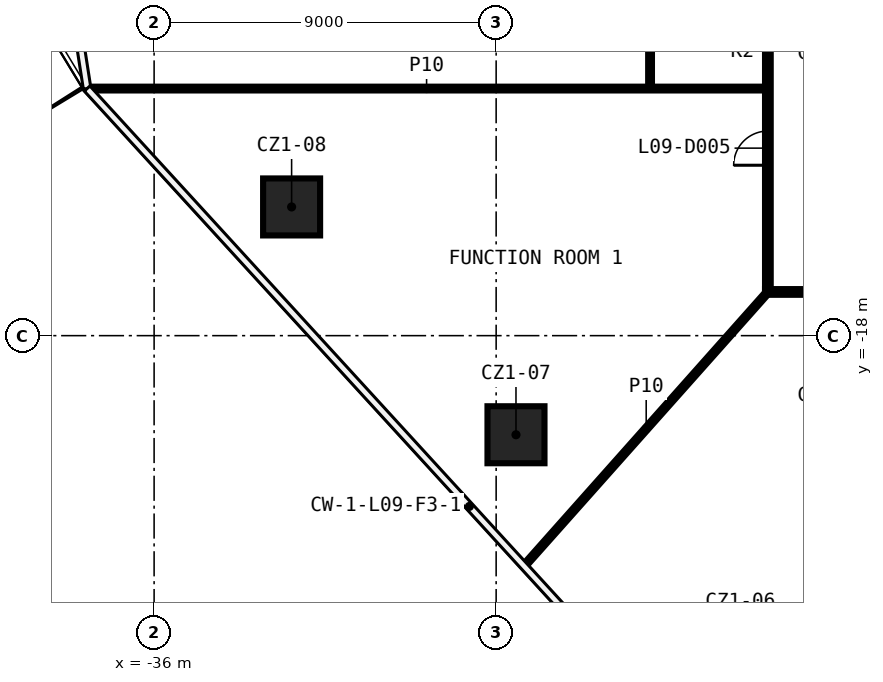
"""IFC4 building model, lengths in metres.
Left out: names, types, materials, properties, quantities, classifications, styles, units other than length and angle.
Written with IfcOpenShell. Run it as: python <this file> out.ifc"""

import sys

from ifc_helpers import new_model, si_unit, direction, frame, frame_2d, origin, origin_2d, place, context, subcontext, project, spatial, rectangle, extrude, element, fill, save


model = new_model("IFC4")
c1 = context("Model", 3, precision=1e-05, world=origin(), true_north=direction((0.0, 1.0)))
c2 = subcontext(c1, "Body", "Model", "MODEL_VIEW")
j1 = project(units=[si_unit("LENGTHUNIT", "METRE"), si_unit("PLANEANGLEUNIT", "RADIAN")], contexts=[c1])
p1 = place(None, origin())
s1 = spatial("IfcSite", under=j1, at=p1, CompositionType="ELEMENT")
p2 = place(p1, origin())
s2 = spatial("IfcBuilding", under=s1, at=p2, CompositionType="ELEMENT")
p3 = place(p2, frame((0.0, 0.0, 55.1)))
s3 = spatial("IfcBuildingStorey", under=s2, at=p3, CompositionType="ELEMENT", Elevation=55.1)
for number, where, z_axis, x_axis in (
    (1, (-26.478, -20.608, 0.0), (0.0, 0.0, 1.0), (1.0, 0.0, 0.0)),
    (2, (-32.382, -14.613, 0.0), (0.0, 0.0, 1.0), (1.0, 0.0, 0.0)),
):
    element("IfcColumn", number, at=place(p3, frame(where, z_axis=z_axis, x_axis=x_axis)), inside=s3, PredefinedType="COLUMN", context=c2, shape_type="SweptSolid", body=[
        extrude(rectangle(XDim=1.5, YDim=1.5, at=origin_2d()), origin(), (0.0, 0.0, 1.0), 3.3),
    ])
p4 = place(p3, frame((19.925, -16.85, 0.0), z_axis=(0.0, 0.0, 1.0), x_axis=(-1.0, 0.0, 0.0)))
e3 = element("IfcWall", 3, at=p4, inside=s3, PredefinedType="PARTITIONING", context=c2, shape_type="SweptSolid", body=[
    extrude(rectangle(XDim=39.85, YDim=0.15, at=frame_2d((19.925, 0.0))), origin(), (0.0, 0.0, 1.0), 3.3),
])
p5 = place(p4, frame((35.041, 0.0, 0.0)))
e4 = element("IfcOpeningElement", 4, at=p5, cuts=e3, PredefinedType="OPENING", context=c2, shape_type="SweptSolid", body=[
    extrude(rectangle(XDim=0.9, YDim=2.1, at=frame_2d((0.45, 1.05))), frame((0.0, 0.085, 0.0), z_axis=(0.0, -1.0, 0.0), x_axis=(1.0, 0.0, 0.0)), (0.0, 0.0, 1.0), 0.17),
])
p6 = place(p4, frame((31.0, 0.0, 0.0)))
e5 = element("IfcOpeningElement", 5, at=p6, cuts=e3, PredefinedType="OPENING", context=c2, shape_type="SweptSolid", body=[
    extrude(rectangle(XDim=1.0, YDim=2.1, at=frame_2d((0.5, 1.05))), frame((0.0, 0.085, 0.0), z_axis=(0.0, -1.0, 0.0), x_axis=(1.0, 0.0, 0.0)), (0.0, 0.0, 1.0), 0.17),
])
p7 = place(p4, frame((25.711, 0.0, 0.0)))
e6 = element("IfcOpeningElement", 6, at=p7, cuts=e3, PredefinedType="OPENING", context=c2, shape_type="SweptSolid", body=[
    extrude(rectangle(XDim=0.9, YDim=2.1, at=frame_2d((0.45, 1.05))), frame((0.0, 0.085, 0.0), z_axis=(0.0, -1.0, 0.0), x_axis=(1.0, 0.0, 0.0)), (0.0, 0.0, 1.0), 0.17),
])
p8 = place(p4, frame((22.072, 0.0, 0.0)))
e7 = element("IfcOpeningElement", 7, at=p8, cuts=e3, PredefinedType="OPENING", context=c2, shape_type="SweptSolid", body=[
    extrude(rectangle(XDim=0.9, YDim=2.1, at=frame_2d((0.45, 1.05))), frame((0.0, 0.085, 0.0), z_axis=(0.0, -1.0, 0.0), x_axis=(1.0, 0.0, 0.0)), (0.0, 0.0, 1.0), 0.17),
])
p9 = place(p4, frame((17.034, 0.0, 0.0)))
e8 = element("IfcOpeningElement", 8, at=p9, cuts=e3, PredefinedType="OPENING", context=c2, shape_type="SweptSolid", body=[
    extrude(rectangle(XDim=0.9, YDim=2.1, at=frame_2d((0.45, 1.05))), frame((0.0, 0.085, 0.0), z_axis=(0.0, -1.0, 0.0), x_axis=(1.0, 0.0, 0.0)), (0.0, 0.0, 1.0), 0.17),
])
p10 = place(p4, frame((13.675, 0.0, 0.0)))
e9 = element("IfcOpeningElement", 9, at=p10, cuts=e3, PredefinedType="OPENING", context=c2, shape_type="SweptSolid", body=[
    extrude(rectangle(XDim=0.9, YDim=2.1, at=frame_2d((0.45, 1.05))), frame((0.0, 0.085, 0.0), z_axis=(0.0, -1.0, 0.0), x_axis=(1.0, 0.0, 0.0)), (0.0, 0.0, 1.0), 0.17),
])
p11 = place(p4, frame((4.031, 0.0, 0.0)))
e10 = element("IfcOpeningElement", 10, at=p11, cuts=e3, PredefinedType="OPENING", context=c2, shape_type="SweptSolid", body=[
    extrude(rectangle(XDim=1.0, YDim=2.1, at=frame_2d((0.5, 1.05))), frame((0.0, 0.085, 0.0), z_axis=(0.0, -1.0, 0.0), x_axis=(1.0, 0.0, 0.0)), (0.0, 0.0, 1.0), 0.17),
])
p12 = place(p3, frame((-37.736, -11.498, 0.0), z_axis=(0.0, 0.0, 1.0), x_axis=(1.0, 0.0, 0.0)))
e11 = element("IfcWall", 11, at=p12, inside=s3, PredefinedType="PARTITIONING", context=c2, shape_type="SweptSolid", body=[
    extrude(rectangle(XDim=17.811, YDim=0.1, at=frame_2d((8.905, 0.0))), origin(), (0.0, 0.0, 1.0), 3.3),
])
p13 = place(p3, frame((-26.253, -24.05, 0.0), z_axis=(0.0, 0.0, 1.0), x_axis=(0.66458555916, 0.747212175059, 0.0)))
e12 = element("IfcWall", 12, at=p13, inside=s3, PredefinedType="PARTITIONING", context=c2, shape_type="SweptSolid", body=[
    extrude(rectangle(XDim=9.635, YDim=0.1, at=frame_2d((4.818, 0.0))), origin(), (0.0, 0.0, 1.0), 3.3),
])
p14 = place(p3, frame((-19.85, -16.775, 0.0), z_axis=(0.0, 0.0, 1.0), x_axis=(0.0, 1.0, 0.0)))
e13 = element("IfcWall", 13, at=p14, inside=s3, PredefinedType="PARTITIONING", context=c2, shape_type="SweptSolid", body=[
    extrude(rectangle(XDim=33.55, YDim=0.15, at=frame_2d((16.775, 0.0))), origin(), (0.0, 0.0, 1.0), 3.3),
])
p15 = place(p14, frame((12.083, 0.0, 0.0)))
e14 = element("IfcOpeningElement", 14, at=p15, cuts=e13, PredefinedType="OPENING", context=c2, shape_type="SweptSolid", body=[
    extrude(rectangle(XDim=1.0, YDim=2.1, at=frame_2d((0.5, 1.05))), frame((0.0, 0.085, 0.0), z_axis=(0.0, -1.0, 0.0), x_axis=(1.0, 0.0, 0.0)), (0.0, 0.0, 1.0), 0.17),
])
p16 = place(p14, frame((10.128, 0.0, 0.0)))
e15 = element("IfcOpeningElement", 15, at=p16, cuts=e13, PredefinedType="OPENING", context=c2, shape_type="SweptSolid", body=[
    extrude(rectangle(XDim=1.0, YDim=2.1, at=frame_2d((0.5, 1.05))), frame((0.0, 0.085, 0.0), z_axis=(0.0, -1.0, 0.0), x_axis=(1.0, 0.0, 0.0)), (0.0, 0.0, 1.0), 0.17),
])
p17 = place(p14, frame((3.259, 0.0, 0.0)))
e16 = element("IfcOpeningElement", 16, at=p17, cuts=e13, PredefinedType="OPENING", context=c2, shape_type="SweptSolid", body=[
    extrude(rectangle(XDim=0.9, YDim=2.1, at=frame_2d((0.45, 1.05))), frame((0.0, 0.085, 0.0), z_axis=(0.0, -1.0, 0.0), x_axis=(1.0, 0.0, 0.0)), (0.0, 0.0, 1.0), 0.17),
])
p18 = place(p14, frame((30.799, 0.0, 0.0)))
e17 = element("IfcOpeningElement", 17, at=p18, cuts=e13, PredefinedType="OPENING", context=c2, shape_type="SweptSolid", body=[
    extrude(rectangle(XDim=1.0, YDim=2.1, at=frame_2d((0.5, 1.05))), frame((0.0, 0.085, 0.0), z_axis=(0.0, -1.0, 0.0), x_axis=(1.0, 0.0, 0.0)), (0.0, 0.0, 1.0), 0.17),
])
p19 = place(p14, frame((22.638, 0.0, 0.0)))
e18 = element("IfcOpeningElement", 18, at=p19, cuts=e13, PredefinedType="OPENING", context=c2, shape_type="SweptSolid", body=[
    extrude(rectangle(XDim=1.0, YDim=2.1, at=frame_2d((0.5, 1.05))), frame((0.0, 0.085, 0.0), z_axis=(0.0, -1.0, 0.0), x_axis=(1.0, 0.0, 0.0)), (0.0, 0.0, 1.0), 0.17),
])
p20 = place(p14, frame((18.681, 0.0, 0.0)))
e19 = element("IfcOpeningElement", 19, at=p20, cuts=e13, PredefinedType="OPENING", context=c2, shape_type="SweptSolid", body=[
    extrude(rectangle(XDim=0.9, YDim=2.1, at=frame_2d((0.45, 1.05))), frame((0.0, 0.085, 0.0), z_axis=(0.0, -1.0, 0.0), x_axis=(1.0, 0.0, 0.0)), (0.0, 0.0, 1.0), 0.17),
])
p21 = place(p3, frame((-22.95, -11.448, 0.0), z_axis=(0.0, 0.0, 1.0), x_axis=(0.0, 1.0, 0.0)))
e20 = element("IfcWall", 20, at=p21, inside=s3, PredefinedType="PARTITIONING", context=c2, shape_type="SweptSolid", body=[
    extrude(rectangle(XDim=2.3, YDim=0.1, at=frame_2d((1.15, 0.0))), origin(), (0.0, 0.0, 1.0), 3.3),
])
p22 = place(p17, origin())
e21 = element("IfcDoor", 21, at=p22, inside=s3, OperationType="SINGLE_SWING_RIGHT", PredefinedType="DOOR", context=c2, shape_type="SweptSolid", body=[
    extrude(rectangle(XDim=0.9, YDim=2.1, at=frame_2d((0.45, 1.05))), frame((0.0, 0.025, 0.0), z_axis=(0.0, -1.0, 0.0), x_axis=(1.0, 0.0, 0.0)), (0.0, 0.0, 1.0), 0.05),
])
fill(e16, e21)
save(model, sys.argv[1])
